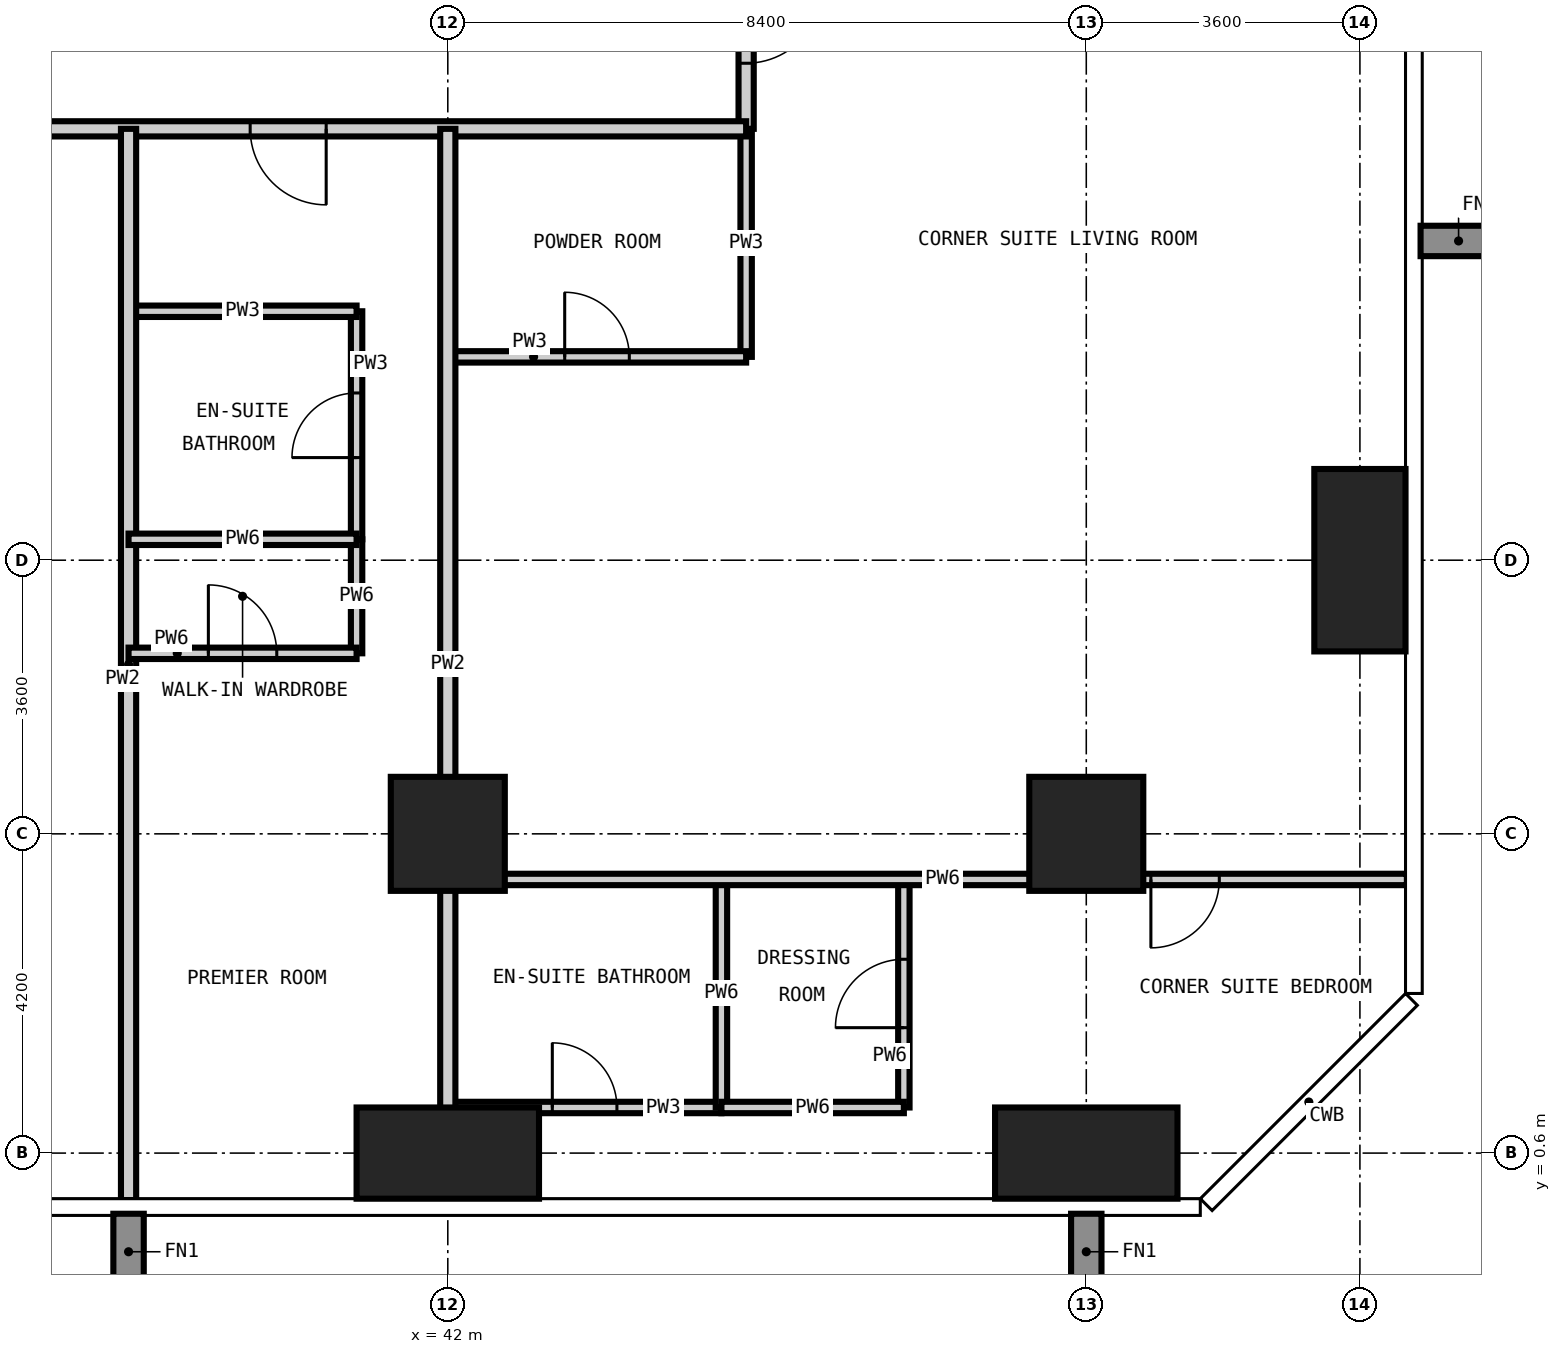
"""IFC4 building model, lengths in metres.
Left out: names, types, materials, properties, quantities, classifications, styles, units other than length and angle.
Written with IfcOpenShell. Run it as: python <this file> out.ifc"""

import sys

from ifc_helpers import new_model, si_unit, direction, frame, frame_2d, origin, origin_2d, place, context, subcontext, project, spatial, rectangle, extrude, element, fill, save


model = new_model("IFC4")
c1 = context("Model", 3, precision=1e-05, world=origin(), true_north=direction((0.0, 1.0)))
c2 = subcontext(c1, "Body", "Model", "MODEL_VIEW")
j1 = project(units=[si_unit("LENGTHUNIT", "METRE"), si_unit("PLANEANGLEUNIT", "RADIAN")], contexts=[c1])
p1 = place(None, origin())
s1 = spatial("IfcSite", under=j1, at=p1, CompositionType="ELEMENT")
p2 = place(p1, origin())
s2 = spatial("IfcBuilding", under=s1, at=p2, CompositionType="ELEMENT")
p3 = place(p2, frame((0.0, 0.0, 100.8)))
s3 = spatial("IfcBuildingStorey", under=s2, at=p3, CompositionType="ELEMENT", Elevation=100.8)
p4 = place(p3, frame((42.0, 0.6, -0.35), z_axis=(0.0, 0.0, 1.0), x_axis=(1.0, 0.0, 0.0)))
e1 = element("IfcColumn", 1, at=p4, inside=s3, PredefinedType="COLUMN", context=c2, shape_type="SweptSolid", body=[
    extrude(rectangle(XDim=2.4, YDim=1.2, at=origin_2d()), origin(), (0.0, 0.0, 1.0), 3.6),
])
p5 = place(p3, frame((42.0, 4.8, -0.35), z_axis=(0.0, 0.0, 1.0), x_axis=(1.0, 0.0, 0.0)))
e2 = element("IfcColumn", 2, at=p5, inside=s3, PredefinedType="COLUMN", context=c2, shape_type="SweptSolid", body=[
    extrude(rectangle(XDim=1.5, YDim=1.5, at=origin_2d()), origin(), (0.0, 0.0, 1.0), 3.6),
])
p6 = place(p3, frame((50.4, 0.6, -0.35), z_axis=(0.0, 0.0, 1.0), x_axis=(1.0, 0.0, 0.0)))
e3 = element("IfcColumn", 3, at=p6, inside=s3, PredefinedType="COLUMN", context=c2, shape_type="SweptSolid", body=[
    extrude(rectangle(XDim=2.4, YDim=1.2, at=origin_2d()), origin(), (0.0, 0.0, 1.0), 3.6),
])
p7 = place(p3, frame((50.4, 4.8, -0.35), z_axis=(0.0, 0.0, 1.0), x_axis=(1.0, 0.0, 0.0)))
e4 = element("IfcColumn", 4, at=p7, inside=s3, PredefinedType="COLUMN", context=c2, shape_type="SweptSolid", body=[
    extrude(rectangle(XDim=1.5, YDim=1.5, at=origin_2d()), origin(), (0.0, 0.0, 1.0), 3.6),
])
p8 = place(p3, frame((54.0, 8.4, -0.35), z_axis=(0.0, 0.0, 1.0), x_axis=(1.0, 0.0, 0.0)))
e5 = element("IfcColumn", 5, at=p8, inside=s3, PredefinedType="COLUMN", context=c2, shape_type="SweptSolid", body=[
    extrude(rectangle(XDim=1.2, YDim=2.4, at=origin_2d()), origin(), (0.0, 0.0, 1.0), 3.6),
])
p9 = place(p3, frame((40.8, 8.675, 0.0), z_axis=(0.0, 0.0, 1.0), x_axis=(0.0, 1.0, 0.0)))
e6 = element("IfcWall", 6, at=p9, inside=s3, PredefinedType="PARTITIONING", context=c2, shape_type="SweptSolid", body=[
    extrude(rectangle(XDim=3.0, YDim=0.15, at=frame_2d((1.5, 0.0))), origin(), (0.0, 0.0, 1.0), 3.25),
])
p10 = place(p9, frame((1.075, 0.0, 0.0)))
e7 = element("IfcOpeningElement", 7, at=p10, cuts=e6, PredefinedType="OPENING", context=c2, shape_type="SweptSolid", body=[
    extrude(rectangle(XDim=0.85, YDim=2.1, at=frame_2d((0.425, 1.05))), frame((0.0, 0.085, 0.0), z_axis=(0.0, -1.0, 0.0), x_axis=(1.0, 0.0, 0.0)), (0.0, 0.0, 1.0), 0.17),
])
p11 = place(p3, frame((45.925, 11.075, 0.0), z_axis=(0.0, 0.0, 1.0), x_axis=(0.0, 1.0, 0.0)))
e8 = element("IfcWall", 8, at=p11, inside=s3, PredefinedType="PARTITIONING", context=c2, shape_type="SweptSolid", body=[
    extrude(rectangle(XDim=3.0, YDim=0.15, at=frame_2d((1.5, 0.0))), origin(), (0.0, 0.0, 1.0), 3.25),
])
p12 = place(p3, frame((42.0, 1.2, 0.0), z_axis=(0.0, 0.0, 1.0), x_axis=(1.0, 0.0, 0.0)))
e9 = element("IfcWall", 9, at=p12, inside=s3, PredefinedType="PARTITIONING", context=c2, shape_type="SweptSolid", body=[
    extrude(rectangle(XDim=3.6, YDim=0.15, at=frame_2d((1.8, 0.0))), origin(), (0.0, 0.0, 1.0), 3.25),
])
p13 = place(p12, frame((1.375, 0.0, 0.0)))
e10 = element("IfcOpeningElement", 10, at=p13, cuts=e9, PredefinedType="OPENING", context=c2, shape_type="SweptSolid", body=[
    extrude(rectangle(XDim=0.85, YDim=2.1, at=frame_2d((0.425, 1.05))), frame((0.0, 0.085, 0.0), z_axis=(0.0, -1.0, 0.0), x_axis=(1.0, 0.0, 0.0)), (0.0, 0.0, 1.0), 0.17),
])
p14 = place(p3, frame((42.0, 11.075, 0.0), z_axis=(0.0, 0.0, 1.0), x_axis=(1.0, 0.0, 0.0)))
e11 = element("IfcWall", 11, at=p14, inside=s3, PredefinedType="PARTITIONING", context=c2, shape_type="SweptSolid", body=[
    extrude(rectangle(XDim=3.925, YDim=0.15, at=frame_2d((1.962, 0.0))), origin(), (0.0, 0.0, 1.0), 3.25),
])
p15 = place(p14, frame((1.538, 0.0, 0.0)))
e12 = element("IfcOpeningElement", 12, at=p15, cuts=e11, PredefinedType="OPENING", context=c2, shape_type="SweptSolid", body=[
    extrude(rectangle(XDim=0.85, YDim=2.1, at=frame_2d((0.425, 1.05))), frame((0.0, 0.085, 0.0), z_axis=(0.0, -1.0, 0.0), x_axis=(1.0, 0.0, 0.0)), (0.0, 0.0, 1.0), 0.17),
])
p16 = place(p3, frame((37.8, 11.675, 0.0), z_axis=(0.0, 0.0, 1.0), x_axis=(1.0, 0.0, 0.0)))
e13 = element("IfcWall", 13, at=p16, inside=s3, PredefinedType="PARTITIONING", context=c2, shape_type="SweptSolid", body=[
    extrude(rectangle(XDim=3.0, YDim=0.15, at=frame_2d((1.5, 0.0))), origin(), (0.0, 0.0, 1.0), 3.25),
])
p17 = place(p3, frame((45.925, 45.325, 0.0), z_axis=(0.0, 0.0, 1.0), x_axis=(0.0, -1.0, 0.0)))
e14 = element("IfcWall", 14, at=p17, inside=s3, PredefinedType="PARTITIONING", context=c2, shape_type="SweptSolid", body=[
    extrude(rectangle(XDim=31.25, YDim=0.2, at=frame_2d((15.625, 0.0))), origin(), (0.0, 0.0, 1.0), 3.25),
])
p18 = place(p17, frame((25.925, 0.0, 0.0)))
e15 = element("IfcOpeningElement", 15, at=p18, cuts=e14, PredefinedType="OPENING", context=c2, shape_type="SweptSolid", body=[
    extrude(rectangle(XDim=1.0, YDim=2.2, at=frame_2d((0.5, 1.1))), frame((0.0, 0.11, 0.0), z_axis=(0.0, -1.0, 0.0), x_axis=(1.0, 0.0, 0.0)), (0.0, 0.0, 1.0), 0.22),
])
p19 = place(p17, frame((19.625, 0.0, 0.0)))
e16 = element("IfcOpeningElement", 16, at=p19, cuts=e14, PredefinedType="OPENING", context=c2, shape_type="SweptSolid", body=[
    extrude(rectangle(XDim=1.0, YDim=2.2, at=frame_2d((0.5, 1.1))), frame((0.0, 0.11, 0.0), z_axis=(0.0, -1.0, 0.0), x_axis=(1.0, 0.0, 0.0)), (0.0, 0.0, 1.0), 0.22),
])
p20 = place(p17, frame((11.225, 0.0, 0.0)))
e17 = element("IfcOpeningElement", 17, at=p20, cuts=e14, PredefinedType="OPENING", context=c2, shape_type="SweptSolid", body=[
    extrude(rectangle(XDim=1.0, YDim=2.2, at=frame_2d((0.5, 1.1))), frame((0.0, 0.11, 0.0), z_axis=(0.0, -1.0, 0.0), x_axis=(1.0, 0.0, 0.0)), (0.0, 0.0, 1.0), 0.22),
])
p21 = place(p17, frame((4.925, 0.0, 0.0)))
e18 = element("IfcOpeningElement", 18, at=p21, cuts=e14, PredefinedType="OPENING", context=c2, shape_type="SweptSolid", body=[
    extrude(rectangle(XDim=1.0, YDim=2.2, at=frame_2d((0.5, 1.1))), frame((0.0, 0.11, 0.0), z_axis=(0.0, -1.0, 0.0), x_axis=(1.0, 0.0, 0.0)), (0.0, 0.0, 1.0), 0.22),
])
p22 = place(p17, frame((29.387, 0.0, 0.0)))
e19 = element("IfcOpeningElement", 19, at=p22, cuts=e14, PredefinedType="OPENING", context=c2, shape_type="SweptSolid", body=[
    extrude(rectangle(XDim=1.0, YDim=2.2, at=frame_2d((0.5, 1.1))), frame((0.0, 0.11, 0.0), z_axis=(0.0, -1.0, 0.0), x_axis=(1.0, 0.0, 0.0)), (0.0, 0.0, 1.0), 0.22),
])
p23 = place(p17, frame((1.162, 0.0, 0.0)))
e20 = element("IfcOpeningElement", 20, at=p23, cuts=e14, PredefinedType="OPENING", context=c2, shape_type="SweptSolid", body=[
    extrude(rectangle(XDim=1.0, YDim=2.2, at=frame_2d((0.5, 1.1))), frame((0.0, 0.11, 0.0), z_axis=(0.0, -1.0, 0.0), x_axis=(1.0, 0.0, 0.0)), (0.0, 0.0, 1.0), 0.22),
])
p24 = place(p3, frame((45.925, 14.075, 0.0), z_axis=(0.0, 0.0, 1.0), x_axis=(-1.0, 0.0, 0.0)))
e21 = element("IfcWall", 21, at=p24, inside=s3, PredefinedType="PARTITIONING", context=c2, shape_type="SweptSolid", body=[
    extrude(rectangle(XDim=33.325, YDim=0.2, at=frame_2d((16.663, 0.0))), origin(), (0.0, 0.0, 1.0), 3.25),
])
p25 = place(p24, frame((26.525, 0.0, 0.0)))
e22 = element("IfcOpeningElement", 22, at=p25, cuts=e21, PredefinedType="OPENING", context=c2, shape_type="SweptSolid", body=[
    extrude(rectangle(XDim=1.0, YDim=2.2, at=frame_2d((0.5, 1.1))), frame((0.0, 0.11, 0.0), z_axis=(0.0, -1.0, 0.0), x_axis=(1.0, 0.0, 0.0)), (0.0, 0.0, 1.0), 0.22),
])
p26 = place(p24, frame((20.225, 0.0, 0.0)))
e23 = element("IfcOpeningElement", 23, at=p26, cuts=e21, PredefinedType="OPENING", context=c2, shape_type="SweptSolid", body=[
    extrude(rectangle(XDim=1.0, YDim=2.2, at=frame_2d((0.5, 1.1))), frame((0.0, 0.11, 0.0), z_axis=(0.0, -1.0, 0.0), x_axis=(1.0, 0.0, 0.0)), (0.0, 0.0, 1.0), 0.22),
])
p27 = place(p24, frame((11.825, 0.0, 0.0)))
e24 = element("IfcOpeningElement", 24, at=p27, cuts=e21, PredefinedType="OPENING", context=c2, shape_type="SweptSolid", body=[
    extrude(rectangle(XDim=1.0, YDim=2.2, at=frame_2d((0.5, 1.1))), frame((0.0, 0.11, 0.0), z_axis=(0.0, -1.0, 0.0), x_axis=(1.0, 0.0, 0.0)), (0.0, 0.0, 1.0), 0.22),
])
p28 = place(p24, frame((5.525, 0.0, 0.0)))
e25 = element("IfcOpeningElement", 25, at=p28, cuts=e21, PredefinedType="OPENING", context=c2, shape_type="SweptSolid", body=[
    extrude(rectangle(XDim=1.0, YDim=2.2, at=frame_2d((0.5, 1.1))), frame((0.0, 0.11, 0.0), z_axis=(0.0, -1.0, 0.0), x_axis=(1.0, 0.0, 0.0)), (0.0, 0.0, 1.0), 0.22),
])
for number, where, z_axis, x_axis in (
    (26, (37.8, -0.018, 0.0), (0.0, 0.0, 1.0), (0.0, 1.0, 0.0)),
    (27, (42.0, -0.018, 0.0), (0.0, 0.0, 1.0), (0.0, 1.0, 0.0)),
):
    element("IfcWall", number, at=place(p3, frame(where, z_axis=z_axis, x_axis=x_axis)), inside=s3, PredefinedType="PARTITIONING", context=c2, shape_type="SweptSolid", body=[
        extrude(rectangle(XDim=14.093, YDim=0.2, at=frame_2d((7.046, 0.0))), origin(), (0.0, 0.0, 1.0), 3.25),
    ])
p29 = place(p3, frame((40.8, 7.175, 0.0), z_axis=(0.0, 0.0, 1.0), x_axis=(0.0, 1.0, 0.0)))
e28 = element("IfcWall", 28, at=p29, inside=s3, PredefinedType="PARTITIONING", context=c2, shape_type="SweptSolid", body=[
    extrude(rectangle(XDim=1.5, YDim=0.15, at=frame_2d((0.75, 0.0))), origin(), (0.0, 0.0, 1.0), 3.25),
])
p30 = place(p3, frame((45.6, 1.2, 0.0), z_axis=(0.0, 0.0, 1.0), x_axis=(0.0, 1.0, 0.0)))
e29 = element("IfcWall", 29, at=p30, inside=s3, PredefinedType="PARTITIONING", context=c2, shape_type="SweptSolid", body=[
    extrude(rectangle(XDim=3.0, YDim=0.15, at=frame_2d((1.5, 0.0))), origin(), (0.0, 0.0, 1.0), 3.25),
])
p31 = place(p3, frame((48.0, 1.2, 0.0), z_axis=(0.0, 0.0, 1.0), x_axis=(0.0, 1.0, 0.0)))
e30 = element("IfcWall", 30, at=p31, inside=s3, PredefinedType="PARTITIONING", context=c2, shape_type="SweptSolid", body=[
    extrude(rectangle(XDim=3.0, YDim=0.15, at=frame_2d((1.5, 0.0))), origin(), (0.0, 0.0, 1.0), 3.25),
])
p32 = place(p31, frame((1.05, 0.0, 0.0)))
e31 = element("IfcOpeningElement", 31, at=p32, cuts=e30, PredefinedType="OPENING", context=c2, shape_type="SweptSolid", body=[
    extrude(rectangle(XDim=0.9, YDim=2.1, at=frame_2d((0.45, 1.05))), frame((0.0, 0.085, 0.0), z_axis=(0.0, -1.0, 0.0), x_axis=(1.0, 0.0, 0.0)), (0.0, 0.0, 1.0), 0.17),
])
p33 = place(p3, frame((45.6, 1.2, 0.0), z_axis=(0.0, 0.0, 1.0), x_axis=(1.0, 0.0, 0.0)))
e32 = element("IfcWall", 32, at=p33, inside=s3, PredefinedType="PARTITIONING", context=c2, shape_type="SweptSolid", body=[
    extrude(rectangle(XDim=2.4, YDim=0.15, at=frame_2d((1.2, 0.0))), origin(), (0.0, 0.0, 1.0), 3.25),
])
p34 = place(p3, frame((42.0, 4.2, 0.0), z_axis=(0.0, 0.0, 1.0), x_axis=(1.0, 0.0, 0.0)))
e33 = element("IfcWall", 33, at=p34, inside=s3, PredefinedType="PARTITIONING", context=c2, shape_type="SweptSolid", body=[
    extrude(rectangle(XDim=12.618, YDim=0.15, at=frame_2d((6.309, 0.0))), origin(), (0.0, 0.0, 1.0), 3.25),
])
p35 = place(p34, frame((9.25, 0.0, 0.0)))
e34 = element("IfcOpeningElement", 34, at=p35, cuts=e33, PredefinedType="OPENING", context=c2, shape_type="SweptSolid", body=[
    extrude(rectangle(XDim=0.9, YDim=2.1, at=frame_2d((0.45, 1.05))), frame((0.0, 0.085, 0.0), z_axis=(0.0, -1.0, 0.0), x_axis=(1.0, 0.0, 0.0)), (0.0, 0.0, 1.0), 0.17),
])
p36 = place(p3, frame((37.8, 7.175, 0.0), z_axis=(0.0, 0.0, 1.0), x_axis=(1.0, 0.0, 0.0)))
e35 = element("IfcWall", 35, at=p36, inside=s3, PredefinedType="PARTITIONING", context=c2, shape_type="SweptSolid", body=[
    extrude(rectangle(XDim=3.0, YDim=0.15, at=frame_2d((1.5, 0.0))), origin(), (0.0, 0.0, 1.0), 3.25),
])
p37 = place(p36, frame((1.05, 0.0, 0.0)))
e36 = element("IfcOpeningElement", 36, at=p37, cuts=e35, PredefinedType="OPENING", context=c2, shape_type="SweptSolid", body=[
    extrude(rectangle(XDim=0.9, YDim=2.1, at=frame_2d((0.45, 1.05))), frame((0.0, 0.085, 0.0), z_axis=(0.0, -1.0, 0.0), x_axis=(1.0, 0.0, 0.0)), (0.0, 0.0, 1.0), 0.17),
])
p38 = place(p3, frame((37.8, 8.675, 0.0), z_axis=(0.0, 0.0, 1.0), x_axis=(1.0, 0.0, 0.0)))
e37 = element("IfcWall", 37, at=p38, inside=s3, PredefinedType="PARTITIONING", context=c2, shape_type="SweptSolid", body=[
    extrude(rectangle(XDim=3.0, YDim=0.15, at=frame_2d((1.5, 0.0))), origin(), (0.0, 0.0, 1.0), 3.25),
])
p39 = place(p28, origin())
e38 = element("IfcDoor", 38, at=p39, inside=s3, OperationType="SINGLE_SWING_LEFT", PredefinedType="DOOR", context=c2, shape_type="SweptSolid", body=[
    extrude(rectangle(XDim=1.0, YDim=2.2, at=frame_2d((0.5, 1.1))), frame((0.0, 0.025, 0.0), z_axis=(0.0, -1.0, 0.0), x_axis=(1.0, 0.0, 0.0)), (0.0, 0.0, 1.0), 0.05),
])
fill(e25, e38)
p40 = place(p10, origin())
e39 = element("IfcDoor", 39, at=p40, inside=s3, OperationType="SINGLE_SWING_LEFT", PredefinedType="DOOR", context=c2, shape_type="SweptSolid", body=[
    extrude(rectangle(XDim=0.85, YDim=2.1, at=frame_2d((0.425, 1.05))), frame((0.0, 0.025, 0.0), z_axis=(0.0, -1.0, 0.0), x_axis=(1.0, 0.0, 0.0)), (0.0, 0.0, 1.0), 0.05),
])
fill(e7, e39)
p41 = place(p37, origin())
e40 = element("IfcDoor", 40, at=p41, inside=s3, OperationType="SINGLE_SWING_LEFT", PredefinedType="DOOR", context=c2, shape_type="SweptSolid", body=[
    extrude(rectangle(XDim=0.9, YDim=2.1, at=frame_2d((0.45, 1.05))), frame((0.0, 0.025, 0.0), z_axis=(0.0, -1.0, 0.0), x_axis=(1.0, 0.0, 0.0)), (0.0, 0.0, 1.0), 0.05),
])
fill(e36, e40)
p42 = place(p22, origin())
e41 = element("IfcDoor", 41, at=p42, inside=s3, OperationType="SINGLE_SWING_LEFT", PredefinedType="DOOR", context=c2, shape_type="SweptSolid", body=[
    extrude(rectangle(XDim=1.0, YDim=2.2, at=frame_2d((0.5, 1.1))), frame((0.0, 0.025, 0.0), z_axis=(0.0, -1.0, 0.0), x_axis=(1.0, 0.0, 0.0)), (0.0, 0.0, 1.0), 0.05),
])
fill(e19, e41)
p43 = place(p15, origin())
e42 = element("IfcDoor", 42, at=p43, inside=s3, OperationType="SINGLE_SWING_LEFT", PredefinedType="DOOR", context=c2, shape_type="SweptSolid", body=[
    extrude(rectangle(XDim=0.85, YDim=2.1, at=frame_2d((0.425, 1.05))), frame((0.0, 0.025, 0.0), z_axis=(0.0, -1.0, 0.0), x_axis=(1.0, 0.0, 0.0)), (0.0, 0.0, 1.0), 0.05),
])
fill(e12, e42)
p44 = place(p35, frame((0.9, 0.0, 0.0), z_axis=(0.0, 0.0, 1.0), x_axis=(-1.0, 0.0, 0.0)))
e43 = element("IfcDoor", 43, at=p44, inside=s3, OperationType="SINGLE_SWING_RIGHT", PredefinedType="DOOR", context=c2, shape_type="SweptSolid", body=[
    extrude(rectangle(XDim=0.9, YDim=2.1, at=frame_2d((0.45, 1.05))), frame((0.0, 0.025, 0.0), z_axis=(0.0, -1.0, 0.0), x_axis=(1.0, 0.0, 0.0)), (0.0, 0.0, 1.0), 0.05),
])
fill(e34, e43)
p45 = place(p13, origin())
e44 = element("IfcDoor", 44, at=p45, inside=s3, OperationType="SINGLE_SWING_LEFT", PredefinedType="DOOR", context=c2, shape_type="SweptSolid", body=[
    extrude(rectangle(XDim=0.85, YDim=2.1, at=frame_2d((0.425, 1.05))), frame((0.0, 0.025, 0.0), z_axis=(0.0, -1.0, 0.0), x_axis=(1.0, 0.0, 0.0)), (0.0, 0.0, 1.0), 0.05),
])
fill(e10, e44)
p46 = place(p32, origin())
e45 = element("IfcDoor", 45, at=p46, inside=s3, OperationType="SINGLE_SWING_LEFT", PredefinedType="DOOR", context=c2, shape_type="SweptSolid", body=[
    extrude(rectangle(XDim=0.9, YDim=2.1, at=frame_2d((0.45, 1.05))), frame((0.0, 0.025, 0.0), z_axis=(0.0, -1.0, 0.0), x_axis=(1.0, 0.0, 0.0)), (0.0, 0.0, 1.0), 0.05),
])
fill(e31, e45)
save(model, sys.argv[1])
